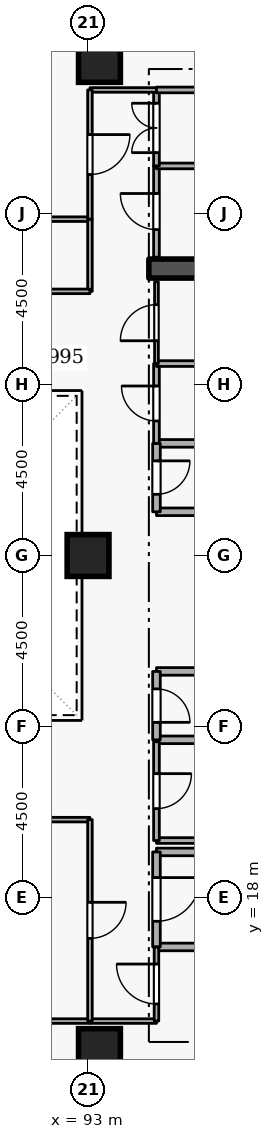
"""IFC4 building model, lengths in metres.
Left out: names, types, materials, properties, quantities, classifications, styles, units other than length and angle.
Written with IfcOpenShell. Run it as: python <this file> out.ifc"""

import sys

from ifc_helpers import new_model, si_unit, direction, frame, frame_2d, origin, origin_2d, place, context, subcontext, project, spatial, rectangle, extrude, element, fill, save


model = new_model("IFC4")
c1 = context("Model", 3, precision=1e-05, world=origin(), true_north=direction((0.0, 1.0)))
c2 = subcontext(c1, "Body", "Model", "MODEL_VIEW")
j1 = project(units=[si_unit("LENGTHUNIT", "METRE"), si_unit("PLANEANGLEUNIT", "RADIAN")], contexts=[c1])
p1 = place(None, origin())
s1 = spatial("IfcSite", under=j1, at=p1, CompositionType="ELEMENT")
p2 = place(p1, origin())
s2 = spatial("IfcBuilding", under=s1, at=p2, CompositionType="ELEMENT")
p3 = place(p2, frame((0.0, 0.0, 167.1)))
s3 = spatial("IfcBuildingStorey", under=s2, at=p3, CompositionType="ELEMENT", Elevation=167.1)
p4 = place(p3, frame((94.6, 34.55, 0.0), z_axis=(0.0, 0.0, 1.0), x_axis=(1.0, 0.0, 0.0)))
e1 = element("IfcWall", 1, at=p4, inside=s3, PredefinedType="SHEAR", context=c2, shape_type="SweptSolid", body=[
    extrude(rectangle(XDim=5.8, YDim=0.5, at=frame_2d((2.9, 0.0))), origin(), (0.0, 0.0, 1.0), 3.6),
])
for number, where, z_axis, x_axis in (
    (2, (93.3, 14.0, 0.0), (0.0, 0.0, 1.0), (1.0, 0.0, 0.0)),
    (3, (93.3, 40.0, 0.0), (0.0, 0.0, 1.0), (1.0, 0.0, 0.0)),
    (4, (93.0, 27.0, 0.0), (0.0, 0.0, 1.0), (1.0, 0.0, 0.0)),
):
    element("IfcColumn", number, at=place(p3, frame(where, z_axis=z_axis, x_axis=x_axis)), inside=s3, PredefinedType="COLUMN", context=c2, shape_type="SweptSolid", body=[
        extrude(rectangle(XDim=1.1, YDim=1.1, at=origin_2d()), origin(), (0.0, 0.0, 1.0), 3.6),
    ])
p5 = place(p3, frame((94.8, 16.7, 0.0), z_axis=(0.0, 0.0, 1.0), x_axis=(1.0, 0.0, 0.0)))
e5 = element("IfcWall", 5, at=p5, inside=s3, PredefinedType="STANDARD", context=c2, shape_type="SweptSolid", body=[
    extrude(rectangle(XDim=5.7, YDim=0.2, at=frame_2d((2.85, 0.0))), origin(), (0.0, 0.0, 1.0), 3.34),
])
p6 = place(p3, frame((97.1, 19.2, 0.0), z_axis=(0.0, 0.0, 1.0), x_axis=(-1.0, 0.0, 0.0)))
e6 = element("IfcWall", 6, at=p6, inside=s3, PredefinedType="STANDARD", context=c2, shape_type="SweptSolid", body=[
    extrude(rectangle(XDim=2.3, YDim=0.2, at=frame_2d((1.15, 0.0))), origin(), (0.0, 0.0, 1.0), 2.545),
])
p7 = place(p3, frame((94.8, 19.2, 0.0), z_axis=(0.0, 0.0, 1.0), x_axis=(0.0, -1.0, 0.0)))
e7 = element("IfcWall", 7, at=p7, inside=s3, PredefinedType="STANDARD", context=c2, shape_type="SweptSolid", body=[
    extrude(rectangle(XDim=2.5, YDim=0.2, at=frame_2d((1.25, 0.0))), origin(), (0.0, 0.0, 1.0), 3.34),
])
p8 = place(p7, frame((0.675, 0.0, 0.0)))
e8 = element("IfcOpeningElement", 8, at=p8, cuts=e7, PredefinedType="OPENING", context=c2, shape_type="SweptSolid", body=[
    extrude(rectangle(XDim=1.15, YDim=2.1, at=frame_2d((0.575, 1.05))), frame((0.0, 0.11, 0.0), z_axis=(0.0, -1.0, 0.0), x_axis=(1.0, 0.0, 0.0)), (0.0, 0.0, 1.0), 0.22),
])
for number, where, z_axis, x_axis in (
    (9, (94.8, 28.15, 0.0), (0.0, 0.0, 1.0), (1.0, 0.0, 0.0)),
    (10, (96.85, 29.95, 0.0), (0.0, 0.0, 1.0), (-1.0, 0.0, 0.0)),
):
    element("IfcWall", number, at=place(p3, frame(where, z_axis=z_axis, x_axis=x_axis)), inside=s3, PredefinedType="STANDARD", context=c2, shape_type="SweptSolid", body=[
        extrude(rectangle(XDim=2.05, YDim=0.2, at=frame_2d((1.025, 0.0))), origin(), (0.0, 0.0, 1.0), 3.34),
    ])
p9 = place(p3, frame((94.8, 29.95, 0.0), z_axis=(0.0, 0.0, 1.0), x_axis=(0.0, -1.0, 0.0)))
e11 = element("IfcWall", 11, at=p9, inside=s3, PredefinedType="STANDARD", context=c2, shape_type="SweptSolid", body=[
    extrude(rectangle(XDim=1.8, YDim=0.2, at=frame_2d((0.9, 0.0))), origin(), (0.0, 0.0, 1.0), 3.34),
])
p10 = place(p9, frame((0.46, 0.0, 0.0)))
e12 = element("IfcOpeningElement", 12, at=p10, cuts=e11, PredefinedType="OPENING", context=c2, shape_type="SweptSolid", body=[
    extrude(rectangle(XDim=0.88, YDim=2.04, at=frame_2d((0.44, 1.02))), frame((0.0, 0.11, 0.0), z_axis=(0.0, -1.0, 0.0), x_axis=(1.0, 0.0, 0.0)), (0.0, 0.0, 1.0), 0.22),
])
for number, where, z_axis, x_axis in (
    (13, (94.8, 22.15, 0.0), (0.0, 0.0, 1.0), (1.0, 0.0, 0.0)),
    (14, (96.85, 23.95, 0.0), (0.0, 0.0, 1.0), (-1.0, 0.0, 0.0)),
):
    element("IfcWall", number, at=place(p3, frame(where, z_axis=z_axis, x_axis=x_axis)), inside=s3, PredefinedType="STANDARD", context=c2, shape_type="SweptSolid", body=[
        extrude(rectangle(XDim=2.05, YDim=0.2, at=frame_2d((1.025, 0.0))), origin(), (0.0, 0.0, 1.0), 3.34),
    ])
p11 = place(p3, frame((94.8, 23.95, 0.0), z_axis=(0.0, 0.0, 1.0), x_axis=(0.0, -1.0, 0.0)))
e15 = element("IfcWall", 15, at=p11, inside=s3, PredefinedType="STANDARD", context=c2, shape_type="SweptSolid", body=[
    extrude(rectangle(XDim=1.8, YDim=0.2, at=frame_2d((0.9, 0.0))), origin(), (0.0, 0.0, 1.0), 3.34),
])
p12 = place(p11, frame((0.46, 0.0, 0.0)))
e16 = element("IfcOpeningElement", 16, at=p12, cuts=e15, PredefinedType="OPENING", context=c2, shape_type="SweptSolid", body=[
    extrude(rectangle(XDim=0.88, YDim=2.04, at=frame_2d((0.44, 1.02))), frame((0.0, 0.11, 0.0), z_axis=(0.0, -1.0, 0.0), x_axis=(1.0, 0.0, 0.0)), (0.0, 0.0, 1.0), 0.22),
])
p13 = place(p3, frame((94.8, 19.5, 0.0), z_axis=(0.0, 0.0, 1.0), x_axis=(1.0, 0.0, 0.0)))
e17 = element("IfcWall", 17, at=p13, inside=s3, PredefinedType="PARTITIONING", context=c2, shape_type="SweptSolid", body=[
    extrude(rectangle(XDim=2.05, YDim=0.15, at=frame_2d((1.025, 0.0))), origin(), (0.0, 0.0, 1.0), 2.545),
])
p14 = place(p3, frame((94.8, 22.1, 0.0), z_axis=(0.0, 0.0, 1.0), x_axis=(0.0, -1.0, 0.0)))
e18 = element("IfcWall", 18, at=p14, inside=s3, PredefinedType="PARTITIONING", context=c2, shape_type="SweptSolid", body=[
    extrude(rectangle(XDim=2.6, YDim=0.15, at=frame_2d((1.3, 0.0))), origin(), (0.0, 0.0, 1.0), 3.34),
])
p15 = place(p14, frame((0.84, 0.0, 0.0)))
e19 = element("IfcOpeningElement", 19, at=p15, cuts=e18, PredefinedType="OPENING", context=c2, shape_type="SweptSolid", body=[
    extrude(rectangle(XDim=0.92, YDim=2.08, at=frame_2d((0.46, 1.04))), frame((0.0, 0.085, 0.0), z_axis=(0.0, -1.0, 0.0), x_axis=(1.0, 0.0, 0.0)), (0.0, 0.0, 1.0), 0.17),
])
p16 = place(p3, frame((94.8, 29.95, 0.0), z_axis=(0.0, 0.0, 1.0), x_axis=(0.0, 1.0, 0.0)))
e20 = element("IfcWall", 20, at=p16, inside=s3, PredefinedType="PARTITIONING", context=c2, shape_type="SweptSolid", body=[
    extrude(rectangle(XDim=2.1, YDim=0.15, at=frame_2d((1.05, 0.0))), origin(), (0.0, 0.0, 1.0), 3.34),
])
p17 = place(p16, frame((0.59, 0.0, 0.0)))
e21 = element("IfcOpeningElement", 21, at=p17, cuts=e20, PredefinedType="OPENING", context=c2, shape_type="SweptSolid", body=[
    extrude(rectangle(XDim=0.92, YDim=2.08, at=frame_2d((0.46, 1.04))), frame((0.0, 0.085, 0.0), z_axis=(0.0, -1.0, 0.0), x_axis=(1.0, 0.0, 0.0)), (0.0, 0.0, 1.0), 0.17),
])
p18 = place(p3, frame((94.8, 32.05, 0.0), z_axis=(0.0, 0.0, 1.0), x_axis=(1.0, 0.0, 0.0)))
e22 = element("IfcWall", 22, at=p18, inside=s3, PredefinedType="PARTITIONING", context=c2, shape_type="SweptSolid", body=[
    extrude(rectangle(XDim=2.05, YDim=0.15, at=frame_2d((1.025, 0.0))), origin(), (0.0, 0.0, 1.0), 3.34),
])
p19 = place(p3, frame((94.8, 32.05, 0.0), z_axis=(0.0, 0.0, 1.0), x_axis=(0.0, 1.0, 0.0)))
e23 = element("IfcWall", 23, at=p19, inside=s3, PredefinedType="PARTITIONING", context=c2, shape_type="SweptSolid", body=[
    extrude(rectangle(XDim=2.15, YDim=0.1, at=frame_2d((1.075, 0.0))), origin(), (0.0, 0.0, 1.0), 3.34),
])
p20 = place(p19, frame((0.6, 0.0, 0.0)))
e24 = element("IfcOpeningElement", 24, at=p20, cuts=e23, PredefinedType="OPENING", context=c2, shape_type="SweptSolid", body=[
    extrude(rectangle(XDim=0.95, YDim=2.1, at=frame_2d((0.475, 1.05))), frame((0.0, 0.06, 0.0), z_axis=(0.0, -1.0, 0.0), x_axis=(1.0, 0.0, 0.0)), (0.0, 0.0, 1.0), 0.12),
])
p21 = place(p3, frame((94.8, 34.85, 0.0), z_axis=(0.0, 0.0, 1.0), x_axis=(0.0, 1.0, 0.0)))
e25 = element("IfcWall", 25, at=p21, inside=s3, PredefinedType="PARTITIONING", context=c2, shape_type="SweptSolid", body=[
    extrude(rectangle(XDim=2.4, YDim=0.15, at=frame_2d((1.2, 0.0))), origin(), (0.0, 0.0, 1.0), 3.34),
])
p22 = place(p21, frame((0.725, 0.0, 0.0)))
e26 = element("IfcOpeningElement", 26, at=p22, cuts=e25, PredefinedType="OPENING", context=c2, shape_type="SweptSolid", body=[
    extrude(rectangle(XDim=0.95, YDim=2.1, at=frame_2d((0.475, 1.05))), frame((0.0, 0.085, 0.0), z_axis=(0.0, -1.0, 0.0), x_axis=(1.0, 0.0, 0.0)), (0.0, 0.0, 1.0), 0.17),
])
p23 = place(p3, frame((94.8, 37.25, 0.0), z_axis=(0.0, 0.0, 1.0), x_axis=(1.0, 0.0, 0.0)))
e27 = element("IfcWall", 27, at=p23, inside=s3, PredefinedType="PARTITIONING", context=c2, shape_type="SweptSolid", body=[
    extrude(rectangle(XDim=5.65, YDim=0.15, at=frame_2d((2.825, 0.0))), origin(), (0.0, 0.0, 1.0), 3.34),
])
p24 = place(p3, frame((94.8, 37.25, 0.0), z_axis=(0.0, 0.0, 1.0), x_axis=(0.0, 1.0, 0.0)))
e28 = element("IfcWall", 28, at=p24, inside=s3, PredefinedType="PARTITIONING", context=c2, shape_type="SweptSolid", body=[
    extrude(rectangle(XDim=2.0, YDim=0.15, at=frame_2d((1.0, 0.0))), origin(), (0.0, 0.0, 1.0), 3.34),
])
p25 = place(p24, frame((0.35, 0.0, 0.0)))
e29 = element("IfcOpeningElement", 29, at=p25, cuts=e28, PredefinedType="OPENING", context=c2, shape_type="SweptSolid", body=[
    extrude(rectangle(XDim=1.3, YDim=2.12, at=frame_2d((0.65, 1.06))), frame((0.0, 0.085, 0.0), z_axis=(0.0, -1.0, 0.0), x_axis=(1.0, 0.0, 0.0)), (0.0, 0.0, 1.0), 0.17),
])
p26 = place(p3, frame((94.8, 39.25, 0.0), z_axis=(0.0, 0.0, 1.0), x_axis=(1.0, 0.0, 0.0)))
e30 = element("IfcWall", 30, at=p26, inside=s3, PredefinedType="PARTITIONING", context=c2, shape_type="SweptSolid", body=[
    extrude(rectangle(XDim=5.65, YDim=0.15, at=frame_2d((2.825, 0.0))), origin(), (0.0, 0.0, 1.0), 3.34),
])
p27 = place(p3, frame((88.5, 14.75, 0.0), z_axis=(0.0, 0.0, 1.0), x_axis=(1.0, 0.0, 0.0)))
e31 = element("IfcWall", 31, at=p27, inside=s3, PredefinedType="PARTITIONING", context=c2, shape_type="SweptSolid", body=[
    extrude(rectangle(XDim=4.55, YDim=0.12, at=frame_2d((2.275, 0.0))), origin(), (0.0, 0.0, 1.0), 3.34),
])
p28 = place(p3, frame((93.05, 14.75, 0.0), z_axis=(0.0, 0.0, 1.0), x_axis=(1.0, 0.0, 0.0)))
e32 = element("IfcWall", 32, at=p28, inside=s3, PredefinedType="PARTITIONING", context=c2, shape_type="SweptSolid", body=[
    extrude(rectangle(XDim=1.75, YDim=0.12, at=frame_2d((0.875, 0.0))), origin(), (0.0, 0.0, 1.0), 3.34),
])
p29 = place(p3, frame((94.8, 14.75, 0.0), z_axis=(0.0, 0.0, 1.0), x_axis=(0.0, 1.0, 0.0)))
e33 = element("IfcWall", 33, at=p29, inside=s3, PredefinedType="PARTITIONING", context=c2, shape_type="SweptSolid", body=[
    extrude(rectangle(XDim=1.95, YDim=0.12, at=frame_2d((0.975, 0.0))), origin(), (0.0, 0.0, 1.0), 3.34),
])
p30 = place(p29, frame((0.45, 0.0, 0.0)))
e34 = element("IfcOpeningElement", 34, at=p30, cuts=e33, PredefinedType="OPENING", context=c2, shape_type="SweptSolid", body=[
    extrude(rectangle(XDim=1.05, YDim=2.1, at=frame_2d((0.525, 1.05))), frame((0.0, 0.07, 0.0), z_axis=(0.0, -1.0, 0.0), x_axis=(1.0, 0.0, 0.0)), (0.0, 0.0, 1.0), 0.14),
])
p31 = place(p3, frame((88.5, 20.05, 0.0), z_axis=(0.0, 0.0, 1.0), x_axis=(1.0, 0.0, 0.0)))
e35 = element("IfcWall", 35, at=p31, inside=s3, PredefinedType="PARTITIONING", context=c2, shape_type="SweptSolid", body=[
    extrude(rectangle(XDim=4.55, YDim=0.12, at=frame_2d((2.275, 0.0))), origin(), (0.0, 0.0, 1.0), 3.34),
])
p32 = place(p3, frame((93.05, 20.05, 0.0), z_axis=(0.0, 0.0, 1.0), x_axis=(0.0, -1.0, 0.0)))
e36 = element("IfcWall", 36, at=p32, inside=s3, PredefinedType="PARTITIONING", context=c2, shape_type="SweptSolid", body=[
    extrude(rectangle(XDim=5.3, YDim=0.12, at=frame_2d((2.65, 0.0))), origin(), (0.0, 0.0, 1.0), 3.34),
])
p33 = place(p32, frame((2.175, 0.0, 0.0)))
e37 = element("IfcOpeningElement", 37, at=p33, cuts=e36, PredefinedType="OPENING", context=c2, shape_type="SweptSolid", body=[
    extrude(rectangle(XDim=0.95, YDim=2.1, at=frame_2d((0.475, 1.05))), frame((0.0, 0.07, 0.0), z_axis=(0.0, -1.0, 0.0), x_axis=(1.0, 0.0, 0.0)), (0.0, 0.0, 1.0), 0.14),
])
p34 = place(p3, frame((88.5, 35.85, 0.0), z_axis=(0.0, 0.0, 1.0), x_axis=(1.0, 0.0, 0.0)))
e38 = element("IfcWall", 38, at=p34, inside=s3, PredefinedType="PARTITIONING", context=c2, shape_type="SweptSolid", body=[
    extrude(rectangle(XDim=4.55, YDim=0.12, at=frame_2d((2.275, 0.0))), origin(), (0.0, 0.0, 1.0), 3.34),
])
p35 = place(p3, frame((93.05, 35.85, 0.0), z_axis=(0.0, 0.0, 1.0), x_axis=(0.0, -1.0, 0.0)))
e39 = element("IfcWall", 39, at=p35, inside=s3, PredefinedType="PARTITIONING", context=c2, shape_type="SweptSolid", body=[
    extrude(rectangle(XDim=1.9, YDim=0.12, at=frame_2d((0.95, 0.0))), origin(), (0.0, 0.0, 1.0), 3.34),
])
p36 = place(p3, frame((93.05, 33.95, 0.0), z_axis=(0.0, 0.0, 1.0), x_axis=(-1.0, 0.0, 0.0)))
e40 = element("IfcWall", 40, at=p36, inside=s3, PredefinedType="PARTITIONING", context=c2, shape_type="SweptSolid", body=[
    extrude(rectangle(XDim=4.55, YDim=0.12, at=frame_2d((2.275, 0.0))), origin(), (0.0, 0.0, 1.0), 3.34),
])
p37 = place(p36, frame((1.8, 0.0, 0.0)))
e41 = element("IfcOpeningElement", 41, at=p37, cuts=e40, PredefinedType="OPENING", context=c2, shape_type="SweptSolid", body=[
    extrude(rectangle(XDim=0.95, YDim=2.1, at=frame_2d((0.475, 1.05))), frame((0.0, 0.07, 0.0), z_axis=(0.0, -1.0, 0.0), x_axis=(1.0, 0.0, 0.0)), (0.0, 0.0, 1.0), 0.14),
])
p38 = place(p3, frame((94.8, 39.25, 0.0), z_axis=(0.0, 0.0, 1.0), x_axis=(-1.0, 0.0, 0.0)))
e42 = element("IfcWall", 42, at=p38, inside=s3, PredefinedType="PARTITIONING", context=c2, shape_type="SweptSolid", body=[
    extrude(rectangle(XDim=1.75, YDim=0.12, at=frame_2d((0.875, 0.0))), origin(), (0.0, 0.0, 1.0), 3.34),
])
p39 = place(p3, frame((93.05, 39.25, 0.0), z_axis=(0.0, 0.0, 1.0), x_axis=(0.0, -1.0, 0.0)))
e43 = element("IfcWall", 43, at=p39, inside=s3, PredefinedType="PARTITIONING", context=c2, shape_type="SweptSolid", body=[
    extrude(rectangle(XDim=3.4, YDim=0.12, at=frame_2d((1.7, 0.0))), origin(), (0.0, 0.0, 1.0), 3.34),
])
p40 = place(p39, frame((1.175, 0.0, 0.0)))
e44 = element("IfcOpeningElement", 44, at=p40, cuts=e43, PredefinedType="OPENING", context=c2, shape_type="SweptSolid", body=[
    extrude(rectangle(XDim=1.05, YDim=2.1, at=frame_2d((0.525, 1.05))), frame((0.0, 0.07, 0.0), z_axis=(0.0, -1.0, 0.0), x_axis=(1.0, 0.0, 0.0)), (0.0, 0.0, 1.0), 0.14),
])
p41 = place(p8, origin())
e45 = element("IfcDoor", 45, at=p41, inside=s3, OperationType="SINGLE_SWING_LEFT", PredefinedType="DOOR", context=c2, shape_type="SweptSolid", body=[
    extrude(rectangle(XDim=1.15, YDim=2.1, at=frame_2d((0.575, 1.05))), frame((0.0, 0.025, 0.0), z_axis=(0.0, -1.0, 0.0), x_axis=(1.0, 0.0, 0.0)), (0.0, 0.0, 1.0), 0.05),
])
fill(e8, e45)
p42 = place(p10, origin())
e46 = element("IfcDoor", 46, at=p42, inside=s3, OperationType="SINGLE_SWING_LEFT", PredefinedType="DOOR", context=c2, shape_type="SweptSolid", body=[
    extrude(rectangle(XDim=0.88, YDim=2.04, at=frame_2d((0.44, 1.02))), frame((0.0, 0.025, 0.0), z_axis=(0.0, -1.0, 0.0), x_axis=(1.0, 0.0, 0.0)), (0.0, 0.0, 1.0), 0.05),
])
fill(e12, e46)
p43 = place(p12, origin())
e47 = element("IfcDoor", 47, at=p43, inside=s3, OperationType="SINGLE_SWING_RIGHT", PredefinedType="DOOR", context=c2, shape_type="SweptSolid", body=[
    extrude(rectangle(XDim=0.88, YDim=2.04, at=frame_2d((0.44, 1.02))), frame((0.0, 0.025, 0.0), z_axis=(0.0, -1.0, 0.0), x_axis=(1.0, 0.0, 0.0)), (0.0, 0.0, 1.0), 0.05),
])
fill(e16, e47)
p44 = place(p15, origin())
e48 = element("IfcDoor", 48, at=p44, inside=s3, OperationType="SINGLE_SWING_LEFT", PredefinedType="DOOR", context=c2, shape_type="SweptSolid", body=[
    extrude(rectangle(XDim=0.92, YDim=2.08, at=frame_2d((0.46, 1.04))), frame((0.0, 0.025, 0.0), z_axis=(0.0, -1.0, 0.0), x_axis=(1.0, 0.0, 0.0)), (0.0, 0.0, 1.0), 0.05),
])
fill(e19, e48)
p45 = place(p17, origin())
e49 = element("IfcDoor", 49, at=p45, inside=s3, OperationType="SINGLE_SWING_RIGHT", PredefinedType="DOOR", context=c2, shape_type="SweptSolid", body=[
    extrude(rectangle(XDim=0.92, YDim=2.08, at=frame_2d((0.46, 1.04))), frame((0.0, 0.025, 0.0), z_axis=(0.0, -1.0, 0.0), x_axis=(1.0, 0.0, 0.0)), (0.0, 0.0, 1.0), 0.05),
])
fill(e21, e49)
p46 = place(p20, origin())
e50 = element("IfcDoor", 50, at=p46, inside=s3, OperationType="SINGLE_SWING_LEFT", PredefinedType="DOOR", context=c2, shape_type="SweptSolid", body=[
    extrude(rectangle(XDim=0.95, YDim=2.1, at=frame_2d((0.475, 1.05))), frame((0.0, 0.025, 0.0), z_axis=(0.0, -1.0, 0.0), x_axis=(1.0, 0.0, 0.0)), (0.0, 0.0, 1.0), 0.05),
])
fill(e24, e50)
p47 = place(p22, origin())
e51 = element("IfcDoor", 51, at=p47, inside=s3, OperationType="SINGLE_SWING_RIGHT", PredefinedType="DOOR", context=c2, shape_type="SweptSolid", body=[
    extrude(rectangle(XDim=0.95, YDim=2.1, at=frame_2d((0.475, 1.05))), frame((0.0, 0.025, 0.0), z_axis=(0.0, -1.0, 0.0), x_axis=(1.0, 0.0, 0.0)), (0.0, 0.0, 1.0), 0.05),
])
fill(e26, e51)
p48 = place(p25, origin())
e52 = element("IfcDoor", 52, at=p48, inside=s3, OperationType="DOUBLE_DOOR_SINGLE_SWING", PredefinedType="DOOR", context=c2, shape_type="SweptSolid", body=[
    extrude(rectangle(XDim=1.3, YDim=2.12, at=frame_2d((0.65, 1.06))), frame((0.0, 0.025, 0.0), z_axis=(0.0, -1.0, 0.0), x_axis=(1.0, 0.0, 0.0)), (0.0, 0.0, 1.0), 0.05),
])
fill(e29, e52)
p49 = place(p30, origin())
e53 = element("IfcDoor", 53, at=p49, inside=s3, OperationType="SINGLE_SWING_RIGHT", PredefinedType="DOOR", context=c2, shape_type="SweptSolid", body=[
    extrude(rectangle(XDim=1.05, YDim=2.1, at=frame_2d((0.525, 1.05))), frame((0.0, 0.025, 0.0), z_axis=(0.0, -1.0, 0.0), x_axis=(1.0, 0.0, 0.0)), (0.0, 0.0, 1.0), 0.05),
])
fill(e34, e53)
p50 = place(p33, origin())
e54 = element("IfcDoor", 54, at=p50, inside=s3, OperationType="SINGLE_SWING_LEFT", PredefinedType="DOOR", context=c2, shape_type="SweptSolid", body=[
    extrude(rectangle(XDim=0.95, YDim=2.1, at=frame_2d((0.475, 1.05))), frame((0.0, 0.025, 0.0), z_axis=(0.0, -1.0, 0.0), x_axis=(1.0, 0.0, 0.0)), (0.0, 0.0, 1.0), 0.05),
])
fill(e37, e54)
p51 = place(p40, origin())
e55 = element("IfcDoor", 55, at=p51, inside=s3, OperationType="SINGLE_SWING_LEFT", PredefinedType="DOOR", context=c2, shape_type="SweptSolid", body=[
    extrude(rectangle(XDim=1.05, YDim=2.1, at=frame_2d((0.525, 1.05))), frame((0.0, 0.025, 0.0), z_axis=(0.0, -1.0, 0.0), x_axis=(1.0, 0.0, 0.0)), (0.0, 0.0, 1.0), 0.05),
])
fill(e44, e55)
save(model, sys.argv[1])
